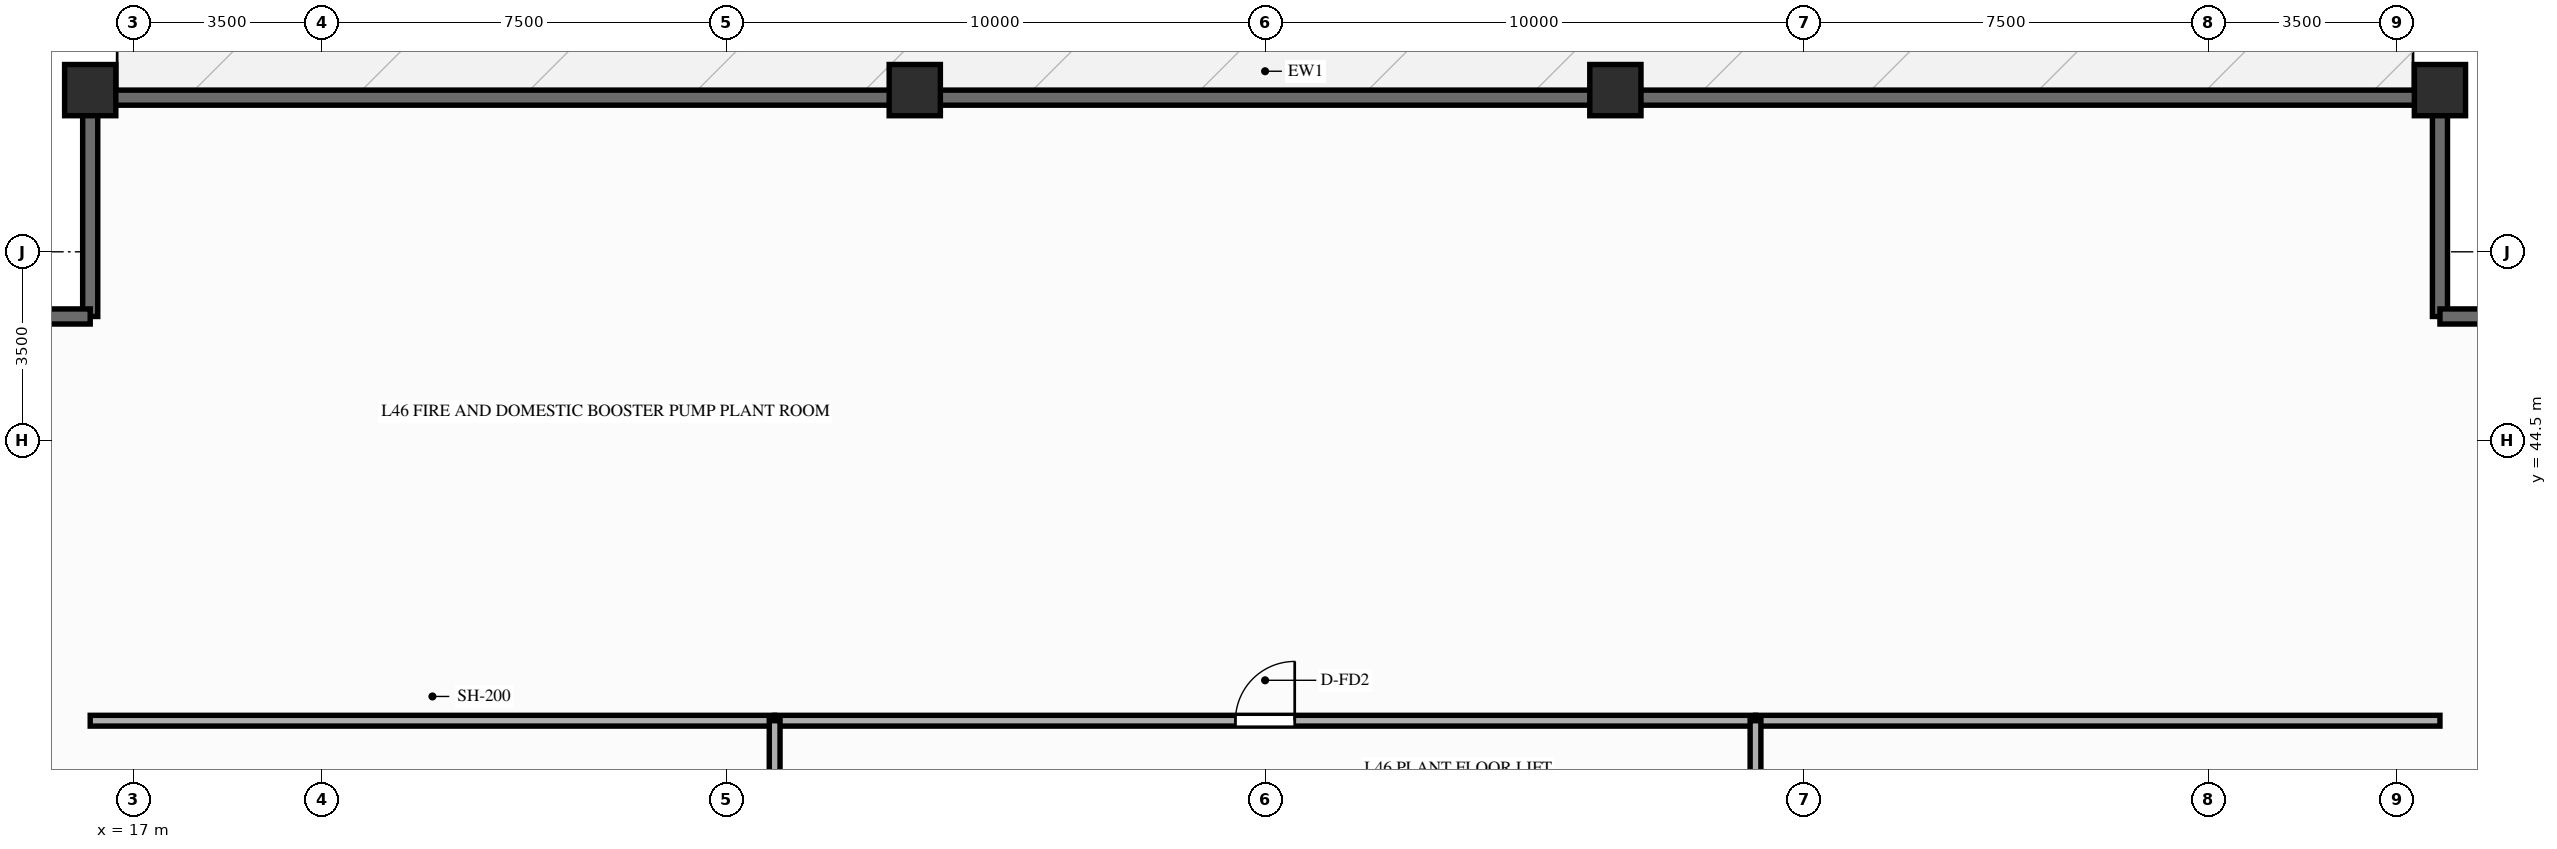
"""IFC4 building model, lengths in metres.
Left out: names, types, materials, properties, quantities, classifications, styles, units other than length and angle.
Written with IfcOpenShell. Run it as: python <this file> out.ifc"""

import sys

from ifc_helpers import new_model, si_unit, direction, frame, frame_2d, origin, origin_2d, place, context, subcontext, project, spatial, rectangle, extrude, source, transform, mapped, element, fill, save


model = new_model("IFC4")
c1 = context("Model", 3, precision=1e-05, world=origin(), true_north=direction((0.0, 1.0)))
c2 = subcontext(c1, "Body", "Model", "MODEL_VIEW")
j1 = project(units=[si_unit("LENGTHUNIT", "METRE"), si_unit("PLANEANGLEUNIT", "RADIAN")], contexts=[c1])
p1 = place(None, origin())
s1 = spatial("IfcSite", under=j1, at=p1, CompositionType="ELEMENT")
p2 = place(p1, origin())
s2 = spatial("IfcBuilding", under=s1, at=p2, CompositionType="ELEMENT")
p3 = place(p2, frame((0.0, 0.0, 144.75)))
s3 = spatial("IfcBuildingStorey", under=s2, at=p3, CompositionType="ELEMENT", Elevation=144.75)
m1 = source(origin(), c2, "Body", "SweptSolid", [
    extrude(rectangle(XDim=0.95, YDim=0.95, at=origin_2d()), origin(), (0.0, 0.0, 1.0), 3.95),
])
for number, where, z_axis, x_axis in (
    (1, (59.8, 51.0, 0.0), (0.0, 0.0, 1.0), (1.0, 0.0, 0.0)),
    (2, (44.5, 51.0, 0.0), (0.0, 0.0, 1.0), (1.0, 0.0, 0.0)),
    (3, (31.5, 51.0, 0.0), (0.0, 0.0, 1.0), (1.0, 0.0, 0.0)),
    (4, (16.2, 51.0, 0.0), (0.0, 0.0, 1.0), (1.0, 0.0, 0.0)),
):
    element("IfcColumn", number, at=place(p3, frame(where, z_axis=z_axis, x_axis=x_axis)), inside=s3, PredefinedType="COLUMN", context=c2, shape_type="MappedRepresentation", body=[
        mapped(m1, transform((0.0, 0.0, 0.0), scale=1.0)),
    ])
p4 = place(p3, frame((16.2, 50.86, 0.0), z_axis=(0.0, 0.0, 1.0), x_axis=(1.0, 0.0, 0.0)))
e5 = element("IfcWall", 5, at=p4, inside=s3, PredefinedType="SOLIDWALL", context=c2, shape_type="SweptSolid", body=[
    extrude(rectangle(XDim=43.6, YDim=0.28, at=frame_2d((21.8, 0.0))), origin(), (0.0, 0.0, 1.0), 2.29),
])
for number, where, z_axis, x_axis in (
    (6, (16.2, 46.8, 0.0), (0.0, 0.0, 1.0), (0.0, 1.0, 0.0)),
    (7, (12.0, 46.8, 0.0), (0.0, 0.0, 1.0), (1.0, 0.0, 0.0)),
    (8, (59.8, 46.8, 0.0), (0.0, 0.0, 1.0), (0.0, 1.0, 0.0)),
    (9, (59.8, 46.8, 0.0), (0.0, 0.0, 1.0), (1.0, 0.0, 0.0)),
):
    element("IfcWall", number, at=place(p3, frame(where, z_axis=z_axis, x_axis=x_axis)), inside=s3, PredefinedType="SOLIDWALL", context=c2, shape_type="SweptSolid", body=[
        extrude(rectangle(XDim=4.2, YDim=0.28, at=frame_2d((2.1, 0.0))), origin(), (0.0, 0.0, 1.0), 2.29),
    ])
p5 = place(p3, frame((16.2, 39.3, 0.0), z_axis=(0.0, 0.0, 1.0), x_axis=(1.0, 0.0, 0.0)))
e10 = element("IfcWall", 10, at=p5, inside=s3, PredefinedType="PARTITIONING", context=c2, shape_type="SweptSolid", body=[
    extrude(rectangle(XDim=12.7, YDim=0.2, at=frame_2d((6.35, 0.0))), origin(), (0.0, 0.0, 1.0), 3.61),
])
p6 = place(p3, frame((28.9, 39.3, 0.0), z_axis=(0.0, 0.0, 1.0), x_axis=(1.0, 0.0, 0.0)))
e11 = element("IfcWall", 11, at=p6, inside=s3, PredefinedType="PARTITIONING", context=c2, shape_type="SweptSolid", body=[
    extrude(rectangle(XDim=18.2, YDim=0.2, at=frame_2d((9.1, 0.0))), origin(), (0.0, 0.0, 1.0), 3.61),
])
p7 = place(p6, frame((8.55, 0.0, 0.0)))
e12 = element("IfcOpeningElement", 12, at=p7, cuts=e11, PredefinedType="OPENING", context=c2, shape_type="SweptSolid", body=[
    extrude(rectangle(XDim=1.1, YDim=2.15, at=frame_2d((0.55, 1.075))), frame((0.0, 0.112, 0.0), z_axis=(0.0, -1.0, 0.0), x_axis=(1.0, 0.0, 0.0)), (0.0, 0.0, 1.0), 0.224),
])
p8 = place(p3, frame((47.1, 39.3, 0.0), z_axis=(0.0, 0.0, 1.0), x_axis=(1.0, 0.0, 0.0)))
e13 = element("IfcWall", 13, at=p8, inside=s3, PredefinedType="PARTITIONING", context=c2, shape_type="SweptSolid", body=[
    extrude(rectangle(XDim=12.7, YDim=0.2, at=frame_2d((6.35, 0.0))), origin(), (0.0, 0.0, 1.0), 3.61),
])
p9 = place(p3, frame((28.9, 14.5, 0.0), z_axis=(0.0, 0.0, 1.0), x_axis=(0.0, 1.0, 0.0)))
e14 = element("IfcWall", 14, at=p9, inside=s3, PredefinedType="PARTITIONING", context=c2, shape_type="SweptSolid", body=[
    extrude(rectangle(XDim=24.8, YDim=0.2, at=frame_2d((12.4, 0.0))), origin(), (0.0, 0.0, 1.0), 3.61),
])
p10 = place(p9, frame((11.85, 0.0, 0.0)))
e15 = element("IfcOpeningElement", 15, at=p10, cuts=e14, PredefinedType="OPENING", context=c2, shape_type="SweptSolid", body=[
    extrude(rectangle(XDim=1.1, YDim=2.15, at=frame_2d((0.55, 1.075))), frame((0.0, 0.112, 0.0), z_axis=(0.0, -1.0, 0.0), x_axis=(1.0, 0.0, 0.0)), (0.0, 0.0, 1.0), 0.224),
])
p11 = place(p3, frame((47.1, 14.5, 0.0), z_axis=(0.0, 0.0, 1.0), x_axis=(0.0, 1.0, 0.0)))
e16 = element("IfcWall", 16, at=p11, inside=s3, PredefinedType="PARTITIONING", context=c2, shape_type="SweptSolid", body=[
    extrude(rectangle(XDim=24.8, YDim=0.2, at=frame_2d((12.4, 0.0))), origin(), (0.0, 0.0, 1.0), 3.61),
])
p12 = place(p11, frame((11.85, 0.0, 0.0)))
e17 = element("IfcOpeningElement", 17, at=p12, cuts=e16, PredefinedType="OPENING", context=c2, shape_type="SweptSolid", body=[
    extrude(rectangle(XDim=1.1, YDim=2.15, at=frame_2d((0.55, 1.075))), frame((0.0, 0.112, 0.0), z_axis=(0.0, -1.0, 0.0), x_axis=(1.0, 0.0, 0.0)), (0.0, 0.0, 1.0), 0.224),
])
m2 = source(origin(), c2, "Body", "SweptSolid", [
    extrude(rectangle(XDim=1.1, YDim=2.15, at=frame_2d((0.55, 1.075))), frame((0.0, 0.025, 0.0), z_axis=(0.0, -1.0, 0.0), x_axis=(1.0, 0.0, 0.0)), (0.0, 0.0, 1.0), 0.05),
])
p13 = place(p7, origin())
e18 = element("IfcDoor", 18, at=p13, inside=s3, OperationType="SINGLE_SWING_RIGHT", PredefinedType="DOOR", context=c2, shape_type="MappedRepresentation", body=[
    mapped(m2, transform((0.0, 0.0, 0.0), scale=1.0)),
])
fill(e12, e18)
save(model, sys.argv[1])
